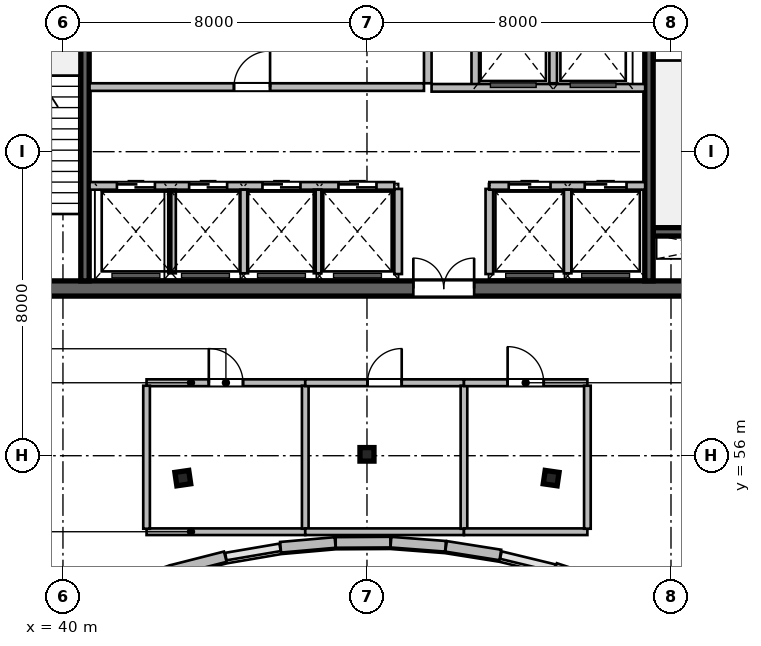
"""IFC4 building model, lengths in metres.
Left out: names, types, materials, properties, quantities, classifications, styles, units other than length and angle.
Written with IfcOpenShell. Run it as: python <this file> out.ifc"""

import sys

from ifc_helpers import new_model, si_unit, direction, frame, frame_2d, origin, origin_2d, place, context, subcontext, project, spatial, rectangle, i_section, extrude, source, transform, mapped, element, fill, save


model = new_model("IFC4")
c1 = context("Model", 3, precision=1e-05, world=origin(), true_north=direction((0.0, 1.0)))
c2 = subcontext(c1, "Body", "Model", "MODEL_VIEW")
j1 = project(units=[si_unit("LENGTHUNIT", "METRE"), si_unit("PLANEANGLEUNIT", "RADIAN")], contexts=[c1])
p1 = place(None, origin())
s1 = spatial("IfcSite", under=j1, at=p1, CompositionType="ELEMENT")
p2 = place(p1, origin())
s2 = spatial("IfcBuilding", under=s1, at=p2, CompositionType="ELEMENT")
p3 = place(p2, frame((0.0, 0.0, 307.8)))
s3 = spatial("IfcBuildingStorey", under=s2, at=p3, CompositionType="ELEMENT", Elevation=307.8)
m1 = source(origin(), c2, "Body", "SweptSolid", [
    extrude(rectangle(XDim=21.6, YDim=0.4, at=frame_2d((10.8, 0.0))), origin(), (0.0, 0.0, 1.0), 4.8),
])
p4 = place(p3, frame((37.2, 60.4, 0.0), z_axis=(0.0, 0.0, 1.0), x_axis=(1.0, 0.0, 0.0)))
e1 = element("IfcWall", 1, at=p4, inside=s3, PredefinedType="SHEAR", context=c2, shape_type="MappedRepresentation", body=[
    mapped(m1, transform((0.0, 0.0, 0.0), scale=1.0)),
])
p5 = place(p4, frame((1.1, 0.0, 0.0)))
e2 = element("IfcOpeningElement", 2, at=p5, cuts=e1, PredefinedType="OPENING", context=c2, shape_type="SweptSolid", body=[
    extrude(rectangle(XDim=1.15, YDim=2.15, at=frame_2d((0.575, 1.075))), frame((0.0, 0.21, 0.0), z_axis=(0.0, -1.0, 0.0), x_axis=(1.0, 0.0, 0.0)), (0.0, 0.0, 1.0), 0.42),
])
p6 = place(p4, frame((19.5, 0.0, 0.0)))
e3 = element("IfcOpeningElement", 3, at=p6, cuts=e1, PredefinedType="OPENING", context=c2, shape_type="SweptSolid", body=[
    extrude(rectangle(XDim=0.9, YDim=2.1, at=frame_2d((0.45, 1.05))), frame((0.0, 0.21, 0.0), z_axis=(0.0, -1.0, 0.0), x_axis=(1.0, 0.0, 0.0)), (0.0, 0.0, 1.0), 0.42),
])
p7 = place(p4, frame((12.02, 0.0, 0.0)))
e4 = element("IfcOpeningElement", 4, at=p7, cuts=e1, PredefinedType="OPENING", context=c2, shape_type="SweptSolid", body=[
    extrude(rectangle(XDim=1.6, YDim=2.15, at=frame_2d((0.8, 1.075))), frame((0.0, 0.21, 0.0), z_axis=(0.0, -1.0, 0.0), x_axis=(1.0, 0.0, 0.0)), (0.0, 0.0, 1.0), 0.42),
])
m2 = source(origin(), c2, "Body", "SweptSolid", [
    extrude(rectangle(XDim=3.27, YDim=0.22, at=frame_2d((1.635, 0.0))), origin(), (0.0, 0.0, 1.0), 4.8),
])
p8 = place(p3, frame((55.53, 61.89, 0.0), z_axis=(0.0, 0.0, 1.0), x_axis=(1.0, 0.0, 0.0)))
e5 = element("IfcWall", 5, at=p8, inside=s3, PredefinedType="SHEAR", context=c2, shape_type="MappedRepresentation", body=[
    mapped(m2, transform((0.0, 0.0, 0.0), scale=1.0)),
])
m3 = source(origin(), c2, "Body", "SweptSolid", [
    extrude(rectangle(XDim=11.2, YDim=0.22, at=frame_2d((5.6, 0.0))), origin(), (0.0, 0.0, 1.0), 4.8),
])
p9 = place(p3, frame((40.58, 60.6, 0.0), z_axis=(0.0, 0.0, 1.0), x_axis=(0.0, 1.0, 0.0)))
e6 = element("IfcWall", 6, at=p9, inside=s3, PredefinedType="SHEAR", context=c2, shape_type="MappedRepresentation", body=[
    mapped(m3, transform((0.0, 0.0, 0.0), scale=1.0)),
])
p10 = place(p3, frame((55.42, 60.6, 0.0), z_axis=(0.0, 0.0, 1.0), x_axis=(0.0, 1.0, 0.0)))
e7 = element("IfcWall", 7, at=p10, inside=s3, PredefinedType="SHEAR", context=c2, shape_type="MappedRepresentation", body=[
    mapped(m3, transform((0.0, 0.0, 0.0), scale=1.0)),
])
p11 = place(p10, frame((9.645, 0.0, 0.0)))
e8 = element("IfcOpeningElement", 8, at=p11, cuts=e7, PredefinedType="OPENING", context=c2, shape_type="SweptSolid", body=[
    extrude(rectangle(XDim=1.15, YDim=2.15, at=frame_2d((0.575, 1.075))), frame((0.0, 0.12, 0.0), z_axis=(0.0, -1.0, 0.0), x_axis=(1.0, 0.0, 0.0)), (0.0, 0.0, 1.0), 0.24),
])
m4 = source(origin(), c2, "Body", "SweptSolid", [
    extrude(i_section(OverallWidth=0.369, OverallDepth=0.356, WebThickness=0.011, FlangeThickness=0.018, at=origin_2d()), origin(), (0.0, 0.0, 1.0), 4.8),
])
for number, where, z_axis, x_axis in (
    (9, (43.154, 55.411, 0.0), (0.0, 0.0, 1.0), (-0.143, 0.99, 0.0)),
    (10, (48.0, 56.036, 0.0), (0.0, 0.0, 1.0), (0.0, 1.0, 0.0)),
    (11, (52.846, 55.411, 0.0), (0.0, 0.0, 1.0), (0.143, 0.99, 0.0)),
):
    element("IfcColumn", number, at=place(p3, frame(where, z_axis=z_axis, x_axis=x_axis)), inside=s3, PredefinedType="COLUMN", context=c2, shape_type="MappedRepresentation", body=[
        mapped(m4, transform((0.0, 0.0, 0.0), scale=1.0)),
    ])
m5 = source(origin(), c2, "Body", "SweptSolid", [
    extrude(rectangle(XDim=1.47, YDim=0.28, at=frame_2d((0.735, 0.0))), origin(), (0.0, 0.0, 1.0), 4.5),
])
p12 = place(p3, frame((54.35, 52.58, 0.0), z_axis=(0.0, 0.0, 1.0), x_axis=(-0.950248878954, 0.311491682145, 0.0)))
e12 = element("IfcWall", 12, at=p12, inside=s3, PredefinedType="SOLIDWALL", context=c2, shape_type="MappedRepresentation", body=[
    mapped(m5, transform((0.0, 0.0, 0.0), scale=1.0)),
])
m6 = source(origin(), c2, "Body", "SweptSolid", [
    extrude(rectangle(XDim=1.446, YDim=0.28, at=frame_2d((0.723, 0.0))), origin(), (0.0, 0.0, 1.0), 4.5),
])
p13 = place(p3, frame((51.509, 53.388, 0.0), z_axis=(0.0, 0.0, 1.0), x_axis=(-0.987650460941, 0.156673440642, 0.0)))
e13 = element("IfcWall", 13, at=p13, inside=s3, PredefinedType="SOLIDWALL", context=c2, shape_type="MappedRepresentation", body=[
    mapped(m6, transform((0.0, 0.0, 0.0), scale=1.0)),
])
m7 = source(origin(), c2, "Body", "SweptSolid", [
    extrude(rectangle(XDim=1.44, YDim=0.28, at=frame_2d((0.72, 0.0))), origin(), (0.0, 0.0, 1.0), 4.5),
])
p14 = place(p3, frame((50.066, 53.616, 0.0), z_axis=(0.0, 0.0, 1.0), x_axis=(-0.997124860794, 0.075776064736, 0.0)))
e14 = element("IfcWall", 14, at=p14, inside=s3, PredefinedType="SOLIDWALL", context=c2, shape_type="MappedRepresentation", body=[
    mapped(m7, transform((0.0, 0.0, 0.0), scale=1.0)),
])
m8 = source(origin(), c2, "Body", "SweptSolid", [
    extrude(rectangle(XDim=1.438, YDim=0.28, at=frame_2d((0.719, 0.0))), origin(), (0.0, 0.0, 1.0), 4.5),
])
p15 = place(p3, frame((48.615, 53.726, 0.0), z_axis=(0.0, 0.0, 1.0), x_axis=(-0.999982357135, -0.005940153174, 0.0)))
e15 = element("IfcWall", 15, at=p15, inside=s3, PredefinedType="SOLIDWALL", context=c2, shape_type="MappedRepresentation", body=[
    mapped(m8, transform((0.0, 0.0, 0.0), scale=1.0)),
])
m9 = source(origin(), c2, "Body", "SweptSolid", [
    extrude(rectangle(XDim=1.441, YDim=0.28, at=frame_2d((0.72, 0.0))), origin(), (0.0, 0.0, 1.0), 4.5),
])
p16 = place(p3, frame((47.162, 53.717, 0.0), z_axis=(0.0, 0.0, 1.0), x_axis=(-0.99617032352, -0.087433898101, 0.0)))
e16 = element("IfcWall", 16, at=p16, inside=s3, PredefinedType="SOLIDWALL", context=c2, shape_type="MappedRepresentation", body=[
    mapped(m9, transform((0.0, 0.0, 0.0), scale=1.0)),
])
m10 = source(origin(), c2, "Body", "SweptSolid", [
    extrude(rectangle(XDim=1.458, YDim=0.28, at=frame_2d((0.729, 0.0))), origin(), (0.0, 0.0, 1.0), 4.5),
])
p17 = place(p3, frame((44.271, 53.343, 0.0), z_axis=(0.0, 0.0, 1.0), x_axis=(-0.969109544438, -0.246630677083, 0.0)))
e17 = element("IfcWall", 17, at=p17, inside=s3, PredefinedType="SOLIDWALL", context=c2, shape_type="MappedRepresentation", body=[
    mapped(m10, transform((0.0, 0.0, 0.0), scale=1.0)),
])
m11 = source(origin(), c2, "Body", "SweptSolid", [
    extrude(rectangle(XDim=1.473, YDim=0.28, at=frame_2d((0.736, 0.0))), origin(), (0.0, 0.0, 1.0), 4.5),
])
p18 = place(p3, frame((42.845, 52.979, 0.0), z_axis=(0.0, 0.0, 1.0), x_axis=(-0.946641296917, -0.322289086026, 0.0)))
e18 = element("IfcWall", 18, at=p18, inside=s3, PredefinedType="SOLIDWALL", context=c2, shape_type="MappedRepresentation", body=[
    mapped(m11, transform((0.0, 0.0, 0.0), scale=1.0)),
])
m12 = source(origin(), c2, "Body", "SweptSolid", [
    extrude(rectangle(XDim=2.24, YDim=0.2, at=frame_2d((1.12, 0.0))), origin(), (0.0, 0.0, 1.0), 4.5),
])
for number, where, z_axis, x_axis in (
    (19, (48.82, 60.78, 0.0), (0.0, 0.0, 1.0), (0.0, 1.0, 0.0)),
    (20, (51.22, 60.78, 0.0), (0.0, 0.0, 1.0), (0.0, 1.0, 0.0)),
):
    element("IfcWall", number, at=place(p3, frame(where, z_axis=z_axis, x_axis=x_axis)), inside=s3, PredefinedType="SOLIDWALL", context=c2, shape_type="MappedRepresentation", body=[
        mapped(m12, transform((0.0, 0.0, 0.0), scale=1.0)),
    ])
m13 = source(origin(), c2, "Body", "SweptSolid", [
    extrude(rectangle(XDim=5.8, YDim=0.2, at=frame_2d((2.9, 0.0))), origin(), (0.0, 0.0, 1.0), 4.5),
])
p19 = place(p3, frame((49.6, 65.8, 0.0), z_axis=(0.0, 0.0, 1.0), x_axis=(0.0, 1.0, 0.0)))
e21 = element("IfcWall", 21, at=p19, inside=s3, PredefinedType="SOLIDWALL", context=c2, shape_type="MappedRepresentation", body=[
    mapped(m13, transform((0.0, 0.0, 0.0), scale=1.0)),
])
m14 = source(origin(), c2, "Body", "SweptSolid", [
    extrude(rectangle(XDim=2.58, YDim=0.2, at=frame_2d((1.29, 0.0))), origin(), (0.0, 0.0, 1.0), 4.5),
])
p20 = place(p3, frame((50.85, 65.68, 0.0), z_axis=(0.0, 0.0, 1.0), x_axis=(0.0, 1.0, 0.0)))
e22 = element("IfcWall", 22, at=p20, inside=s3, PredefinedType="SOLIDWALL", context=c2, shape_type="MappedRepresentation", body=[
    mapped(m14, transform((0.0, 0.0, 0.0), scale=1.0)),
])
m15 = source(origin(), c2, "Body", "SweptSolid", [
    extrude(rectangle(XDim=2.4, YDim=0.2, at=frame_2d((1.2, 0.0))), origin(), (0.0, 0.0, 1.0), 4.5),
])
p21 = place(p3, frame((52.9, 65.8, 0.0), z_axis=(0.0, 0.0, 1.0), x_axis=(0.0, 1.0, 0.0)))
e23 = element("IfcWall", 23, at=p21, inside=s3, PredefinedType="SOLIDWALL", context=c2, shape_type="MappedRepresentation", body=[
    mapped(m15, transform((0.0, 0.0, 0.0), scale=1.0)),
])
m16 = source(origin(), c2, "Body", "SweptSolid", [
    extrude(rectangle(XDim=5.62, YDim=0.2, at=frame_2d((2.81, 0.0))), origin(), (0.0, 0.0, 1.0), 4.5),
])
p22 = place(p3, frame((49.7, 65.68, 0.0), z_axis=(0.0, 0.0, 1.0), x_axis=(1.0, 0.0, 0.0)))
e24 = element("IfcWall", 24, at=p22, inside=s3, PredefinedType="SOLIDWALL", context=c2, shape_type="MappedRepresentation", body=[
    mapped(m16, transform((0.0, 0.0, 0.0), scale=1.0)),
])
m17 = source(origin(), c2, "Body", "SweptSolid", [
    extrude(rectangle(XDim=8.02, YDim=0.2, at=frame_2d((4.01, 0.0))), origin(), (0.0, 0.0, 1.0), 4.5),
])
p23 = place(p3, frame((40.7, 63.1, 0.0), z_axis=(0.0, 0.0, 1.0), x_axis=(1.0, 0.0, 0.0)))
e25 = element("IfcWall", 25, at=p23, inside=s3, PredefinedType="SOLIDWALL", context=c2, shape_type="MappedRepresentation", body=[
    mapped(m17, transform((0.0, 0.0, 0.0), scale=1.0)),
])
p24 = place(p23, frame((0.72, 0.0, 0.0)))
e26 = element("IfcOpeningElement", 26, at=p24, cuts=e25, PredefinedType="OPENING", context=c2, shape_type="SweptSolid", body=[
    extrude(rectangle(XDim=1.0, YDim=2.15, at=frame_2d((0.5, 1.075))), frame((0.0, 0.11, 0.0), z_axis=(0.0, -1.0, 0.0), x_axis=(1.0, 0.0, 0.0)), (0.0, 0.0, 1.0), 0.22),
])
p25 = place(p23, frame((2.62, 0.0, 0.0)))
e27 = element("IfcOpeningElement", 27, at=p25, cuts=e25, PredefinedType="OPENING", context=c2, shape_type="SweptSolid", body=[
    extrude(rectangle(XDim=1.0, YDim=2.15, at=frame_2d((0.5, 1.075))), frame((0.0, 0.11, 0.0), z_axis=(0.0, -1.0, 0.0), x_axis=(1.0, 0.0, 0.0)), (0.0, 0.0, 1.0), 0.22),
])
p26 = place(p23, frame((4.55, 0.0, 0.0)))
e28 = element("IfcOpeningElement", 28, at=p26, cuts=e25, PredefinedType="OPENING", context=c2, shape_type="SweptSolid", body=[
    extrude(rectangle(XDim=1.0, YDim=2.15, at=frame_2d((0.5, 1.075))), frame((0.0, 0.11, 0.0), z_axis=(0.0, -1.0, 0.0), x_axis=(1.0, 0.0, 0.0)), (0.0, 0.0, 1.0), 0.22),
])
p27 = place(p23, frame((6.55, 0.0, 0.0)))
e29 = element("IfcOpeningElement", 29, at=p27, cuts=e25, PredefinedType="OPENING", context=c2, shape_type="SweptSolid", body=[
    extrude(rectangle(XDim=1.0, YDim=2.15, at=frame_2d((0.5, 1.075))), frame((0.0, 0.11, 0.0), z_axis=(0.0, -1.0, 0.0), x_axis=(1.0, 0.0, 0.0)), (0.0, 0.0, 1.0), 0.22),
])
m18 = source(origin(), c2, "Body", "SweptSolid", [
    extrude(rectangle(XDim=4.1, YDim=0.2, at=frame_2d((2.05, 0.0))), origin(), (0.0, 0.0, 1.0), 4.5),
])
p28 = place(p3, frame((51.22, 63.1, 0.0), z_axis=(0.0, 0.0, 1.0), x_axis=(1.0, 0.0, 0.0)))
e30 = element("IfcWall", 30, at=p28, inside=s3, PredefinedType="SOLIDWALL", context=c2, shape_type="MappedRepresentation", body=[
    mapped(m18, transform((0.0, 0.0, 0.0), scale=1.0)),
])
p29 = place(p28, frame((0.51, 0.0, 0.0)))
e31 = element("IfcOpeningElement", 31, at=p29, cuts=e30, PredefinedType="OPENING", context=c2, shape_type="SweptSolid", body=[
    extrude(rectangle(XDim=1.1, YDim=2.15, at=frame_2d((0.55, 1.075))), frame((0.0, 0.11, 0.0), z_axis=(0.0, -1.0, 0.0), x_axis=(1.0, 0.0, 0.0)), (0.0, 0.0, 1.0), 0.22),
])
p30 = place(p28, frame((2.51, 0.0, 0.0)))
e32 = element("IfcOpeningElement", 32, at=p30, cuts=e30, PredefinedType="OPENING", context=c2, shape_type="SweptSolid", body=[
    extrude(rectangle(XDim=1.1, YDim=2.15, at=frame_2d((0.55, 1.075))), frame((0.0, 0.11, 0.0), z_axis=(0.0, -1.0, 0.0), x_axis=(1.0, 0.0, 0.0)), (0.0, 0.0, 1.0), 0.22),
])
m19 = source(origin(), c2, "Body", "SweptSolid", [
    extrude(rectangle(XDim=2.2, YDim=0.2, at=frame_2d((1.1, 0.0))), origin(), (0.0, 0.0, 1.0), 4.5),
])
for number, where, z_axis, x_axis in (
    (33, (42.87, 60.8, 0.0), (0.0, 0.0, 1.0), (0.0, 1.0, 0.0)),
    (34, (44.77, 60.8, 0.0), (0.0, 0.0, 1.0), (0.0, 1.0, 0.0)),
    (35, (46.7, 60.8, 0.0), (0.0, 0.0, 1.0), (0.0, 1.0, 0.0)),
    (36, (53.28, 60.8, 0.0), (0.0, 0.0, 1.0), (0.0, 1.0, 0.0)),
):
    element("IfcWall", number, at=place(p3, frame(where, z_axis=z_axis, x_axis=x_axis)), inside=s3, PredefinedType="SOLIDWALL", context=c2, shape_type="MappedRepresentation", body=[
        mapped(m19, transform((0.0, 0.0, 0.0), scale=1.0)),
    ])
m20 = source(origin(), c2, "Body", "SweptSolid", [
    extrude(rectangle(XDim=8.8, YDim=0.2, at=frame_2d((4.4, 0.0))), origin(), (0.0, 0.0, 1.0), 4.5),
])
p31 = place(p3, frame((40.7, 65.7, 0.0), z_axis=(0.0, 0.0, 1.0), x_axis=(1.0, 0.0, 0.0)))
e37 = element("IfcWall", 37, at=p31, inside=s3, PredefinedType="SOLIDWALL", context=c2, shape_type="MappedRepresentation", body=[
    mapped(m20, transform((0.0, 0.0, 0.0), scale=1.0)),
])
p32 = place(p31, frame((3.8, 0.0, 0.0)))
e38 = element("IfcOpeningElement", 38, at=p32, cuts=e37, PredefinedType="OPENING", context=c2, shape_type="SweptSolid", body=[
    extrude(rectangle(XDim=0.95, YDim=2.15, at=frame_2d((0.475, 1.075))), frame((0.0, 0.11, 0.0), z_axis=(0.0, -1.0, 0.0), x_axis=(1.0, 0.0, 0.0)), (0.0, 0.0, 1.0), 0.22),
])
m21 = source(origin(), c2, "Body", "SweptSolid", [
    extrude(rectangle(XDim=4.176, YDim=0.175, at=frame_2d((2.088, 0.0))), origin(), (0.0, 0.0, 1.0), 4.5),
])
p33 = place(p3, frame((42.2, 54.0, 0.0), z_axis=(0.0, 0.0, 1.0), x_axis=(1.0, 0.0, 0.0)))
e39 = element("IfcWall", 39, at=p33, inside=s3, PredefinedType="PARTITIONING", context=c2, shape_type="MappedRepresentation", body=[
    mapped(m21, transform((0.0, 0.0, 0.0), scale=1.0)),
])
m22 = source(origin(), c2, "Body", "SweptSolid", [
    extrude(rectangle(XDim=4.176, YDim=0.18, at=frame_2d((2.088, 0.0))), origin(), (0.0, 0.0, 1.0), 4.5),
])
p34 = place(p3, frame((42.2, 57.92, 0.0), z_axis=(0.0, 0.0, 1.0), x_axis=(1.0, 0.0, 0.0)))
e40 = element("IfcWall", 40, at=p34, inside=s3, PredefinedType="PLUMBINGWALL", context=c2, shape_type="MappedRepresentation", body=[
    mapped(m22, transform((0.0, 0.0, 0.0), scale=1.0)),
])
p35 = place(p34, frame((1.638, 0.0, 0.0)))
e41 = element("IfcOpeningElement", 41, at=p35, cuts=e40, PredefinedType="OPENING", context=c2, shape_type="SweptSolid", body=[
    extrude(rectangle(XDim=0.9, YDim=2.08, at=frame_2d((0.45, 1.04))), frame((0.0, 0.1, 0.0), z_axis=(0.0, -1.0, 0.0), x_axis=(1.0, 0.0, 0.0)), (0.0, 0.0, 1.0), 0.2),
])
m23 = source(origin(), c2, "Body", "SweptSolid", [
    extrude(rectangle(XDim=3.763, YDim=0.175, at=frame_2d((1.881, 0.0))), origin(), (0.0, 0.0, 1.0), 4.5),
])
for number, where, z_axis, x_axis in (
    (42, (42.2, 54.079, 0.0), (0.0, 0.0, 1.0), (0.0, 1.0, 0.0)),
    (43, (46.376, 54.079, 0.0), (0.0, 0.0, 1.0), (0.0, 1.0, 0.0)),
):
    element("IfcWall", number, at=place(p3, frame(where, z_axis=z_axis, x_axis=x_axis)), inside=s3, PredefinedType="PARTITIONING", context=c2, shape_type="MappedRepresentation", body=[
        mapped(m23, transform((0.0, 0.0, 0.0), scale=1.0)),
    ])
p36 = place(p3, frame((46.376, 54.0, 0.0), z_axis=(0.0, 0.0, 1.0), x_axis=(1.0, 0.0, 0.0)))
e44 = element("IfcWall", 44, at=p36, inside=s3, PredefinedType="PARTITIONING", context=c2, shape_type="MappedRepresentation", body=[
    mapped(m21, transform((0.0, 0.0, 0.0), scale=1.0)),
])
p37 = place(p3, frame((46.376, 57.92, 0.0), z_axis=(0.0, 0.0, 1.0), x_axis=(1.0, 0.0, 0.0)))
e45 = element("IfcWall", 45, at=p37, inside=s3, PredefinedType="PLUMBINGWALL", context=c2, shape_type="MappedRepresentation", body=[
    mapped(m22, transform((0.0, 0.0, 0.0), scale=1.0)),
])
p38 = place(p37, frame((1.638, 0.0, 0.0)))
e46 = element("IfcOpeningElement", 46, at=p38, cuts=e45, PredefinedType="OPENING", context=c2, shape_type="SweptSolid", body=[
    extrude(rectangle(XDim=0.9, YDim=2.08, at=frame_2d((0.45, 1.04))), frame((0.0, 0.1, 0.0), z_axis=(0.0, -1.0, 0.0), x_axis=(1.0, 0.0, 0.0)), (0.0, 0.0, 1.0), 0.2),
])
p39 = place(p3, frame((50.552, 54.079, 0.0), z_axis=(0.0, 0.0, 1.0), x_axis=(0.0, 1.0, 0.0)))
e47 = element("IfcWall", 47, at=p39, inside=s3, PredefinedType="PARTITIONING", context=c2, shape_type="MappedRepresentation", body=[
    mapped(m23, transform((0.0, 0.0, 0.0), scale=1.0)),
])
m24 = source(origin(), c2, "Body", "SweptSolid", [
    extrude(rectangle(XDim=3.248, YDim=0.175, at=frame_2d((1.624, 0.0))), origin(), (0.0, 0.0, 1.0), 4.5),
])
p40 = place(p3, frame((50.552, 54.0, 0.0), z_axis=(0.0, 0.0, 1.0), x_axis=(1.0, 0.0, 0.0)))
e48 = element("IfcWall", 48, at=p40, inside=s3, PredefinedType="PARTITIONING", context=c2, shape_type="MappedRepresentation", body=[
    mapped(m24, transform((0.0, 0.0, 0.0), scale=1.0)),
])
m25 = source(origin(), c2, "Body", "SweptSolid", [
    extrude(rectangle(XDim=3.248, YDim=0.18, at=frame_2d((1.624, 0.0))), origin(), (0.0, 0.0, 1.0), 4.5),
])
p41 = place(p3, frame((50.552, 57.92, 0.0), z_axis=(0.0, 0.0, 1.0), x_axis=(1.0, 0.0, 0.0)))
e49 = element("IfcWall", 49, at=p41, inside=s3, PredefinedType="PLUMBINGWALL", context=c2, shape_type="MappedRepresentation", body=[
    mapped(m25, transform((0.0, 0.0, 0.0), scale=1.0)),
])
p42 = place(p41, frame((1.149, 0.0, 0.0)))
e50 = element("IfcOpeningElement", 50, at=p42, cuts=e49, PredefinedType="OPENING", context=c2, shape_type="SweptSolid", body=[
    extrude(rectangle(XDim=0.95, YDim=2.12, at=frame_2d((0.475, 1.06))), frame((0.0, 0.1, 0.0), z_axis=(0.0, -1.0, 0.0), x_axis=(1.0, 0.0, 0.0)), (0.0, 0.0, 1.0), 0.2),
])
p43 = place(p3, frame((53.8, 54.079, 0.0), z_axis=(0.0, 0.0, 1.0), x_axis=(0.0, 1.0, 0.0)))
e51 = element("IfcWall", 51, at=p43, inside=s3, PredefinedType="PARTITIONING", context=c2, shape_type="MappedRepresentation", body=[
    mapped(m23, transform((0.0, 0.0, 0.0), scale=1.0)),
])
m26 = source(origin(), c2, "Body", "SweptSolid", [
    extrude(rectangle(XDim=1.6, YDim=2.15, at=frame_2d((0.8, 1.075))), frame((0.0, 0.025, 0.0), z_axis=(0.0, -1.0, 0.0), x_axis=(1.0, 0.0, 0.0)), (0.0, 0.0, 1.0), 0.05),
])
p44 = place(p7, origin())
e52 = element("IfcDoor", 52, at=p44, inside=s3, OperationType="DOUBLE_DOOR_SINGLE_SWING", PredefinedType="DOOR", context=c2, shape_type="MappedRepresentation", body=[
    mapped(m26, transform((0.0, 0.0, 0.0), scale=1.0)),
])
fill(e4, e52)
m27 = source(origin(), c2, "Body", "SweptSolid", [
    extrude(rectangle(XDim=1.0, YDim=2.15, at=frame_2d((0.5, 1.075))), frame((0.0, 0.025, 0.0), z_axis=(0.0, -1.0, 0.0), x_axis=(1.0, 0.0, 0.0)), (0.0, 0.0, 1.0), 0.05),
])
p45 = place(p24, origin())
e53 = element("IfcDoor", 53, at=p45, inside=s3, OperationType="DOUBLE_DOOR_SLIDING", PredefinedType="DOOR", context=c2, shape_type="MappedRepresentation", body=[
    mapped(m27, transform((0.0, 0.0, 0.0), scale=1.0)),
])
fill(e26, e53)
p46 = place(p25, origin())
e54 = element("IfcDoor", 54, at=p46, inside=s3, OperationType="DOUBLE_DOOR_SLIDING", PredefinedType="DOOR", context=c2, shape_type="MappedRepresentation", body=[
    mapped(m27, transform((0.0, 0.0, 0.0), scale=1.0)),
])
fill(e27, e54)
p47 = place(p26, origin())
e55 = element("IfcDoor", 55, at=p47, inside=s3, OperationType="DOUBLE_DOOR_SLIDING", PredefinedType="DOOR", context=c2, shape_type="MappedRepresentation", body=[
    mapped(m27, transform((0.0, 0.0, 0.0), scale=1.0)),
])
fill(e28, e55)
p48 = place(p27, origin())
e56 = element("IfcDoor", 56, at=p48, inside=s3, OperationType="DOUBLE_DOOR_SLIDING", PredefinedType="DOOR", context=c2, shape_type="MappedRepresentation", body=[
    mapped(m27, transform((0.0, 0.0, 0.0), scale=1.0)),
])
fill(e29, e56)
m28 = source(origin(), c2, "Body", "SweptSolid", [
    extrude(rectangle(XDim=1.1, YDim=2.15, at=frame_2d((0.55, 1.075))), frame((0.0, 0.025, 0.0), z_axis=(0.0, -1.0, 0.0), x_axis=(1.0, 0.0, 0.0)), (0.0, 0.0, 1.0), 0.05),
])
p49 = place(p29, origin())
e57 = element("IfcDoor", 57, at=p49, inside=s3, OperationType="DOUBLE_DOOR_SLIDING", PredefinedType="DOOR", context=c2, shape_type="MappedRepresentation", body=[
    mapped(m28, transform((0.0, 0.0, 0.0), scale=1.0)),
])
fill(e31, e57)
p50 = place(p30, origin())
e58 = element("IfcDoor", 58, at=p50, inside=s3, OperationType="DOUBLE_DOOR_SLIDING", PredefinedType="DOOR", context=c2, shape_type="MappedRepresentation", body=[
    mapped(m28, transform((0.0, 0.0, 0.0), scale=1.0)),
])
fill(e32, e58)
m29 = source(origin(), c2, "Body", "SweptSolid", [
    extrude(rectangle(XDim=0.95, YDim=2.15, at=frame_2d((0.475, 1.075))), frame((0.0, 0.025, 0.0), z_axis=(0.0, -1.0, 0.0), x_axis=(1.0, 0.0, 0.0)), (0.0, 0.0, 1.0), 0.05),
])
p51 = place(p32, origin())
e59 = element("IfcDoor", 59, at=p51, inside=s3, OperationType="SINGLE_SWING_RIGHT", PredefinedType="DOOR", context=c2, shape_type="MappedRepresentation", body=[
    mapped(m29, transform((0.0, 0.0, 0.0), scale=1.0)),
])
fill(e38, e59)
m30 = source(origin(), c2, "Body", "SweptSolid", [
    extrude(rectangle(XDim=0.9, YDim=2.08, at=frame_2d((0.45, 1.04))), frame((0.0, 0.025, 0.0), z_axis=(0.0, -1.0, 0.0), x_axis=(1.0, 0.0, 0.0)), (0.0, 0.0, 1.0), 0.05),
])
p52 = place(p35, origin())
e60 = element("IfcDoor", 60, at=p52, inside=s3, OperationType="SINGLE_SWING_LEFT", PredefinedType="DOOR", context=c2, shape_type="MappedRepresentation", body=[
    mapped(m30, transform((0.0, 0.0, 0.0), scale=1.0)),
])
fill(e41, e60)
p53 = place(p38, origin())
e61 = element("IfcDoor", 61, at=p53, inside=s3, OperationType="SINGLE_SWING_RIGHT", PredefinedType="DOOR", context=c2, shape_type="MappedRepresentation", body=[
    mapped(m30, transform((0.0, 0.0, 0.0), scale=1.0)),
])
fill(e46, e61)
m31 = source(origin(), c2, "Body", "SweptSolid", [
    extrude(rectangle(XDim=0.95, YDim=2.12, at=frame_2d((0.475, 1.06))), frame((0.0, 0.025, 0.0), z_axis=(0.0, -1.0, 0.0), x_axis=(1.0, 0.0, 0.0)), (0.0, 0.0, 1.0), 0.05),
])
p54 = place(p42, origin())
e62 = element("IfcDoor", 62, at=p54, inside=s3, OperationType="SINGLE_SWING_LEFT", PredefinedType="DOOR", context=c2, shape_type="MappedRepresentation", body=[
    mapped(m31, transform((0.0, 0.0, 0.0), scale=1.0)),
])
fill(e50, e62)
save(model, sys.argv[1])
